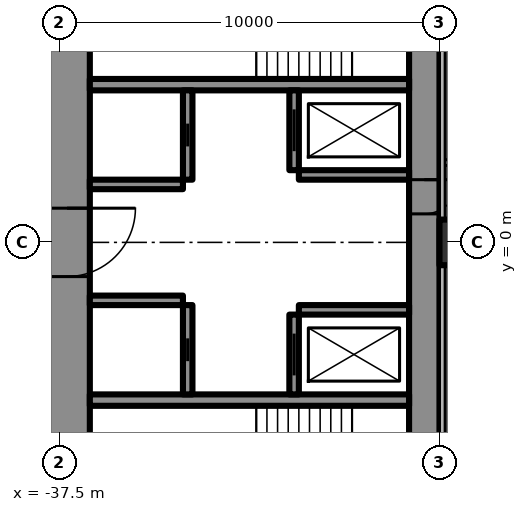
"""IFC4 building model, lengths in metres.
Left out: names, types, materials, properties, quantities, classifications, styles, units other than length and angle.
Written with IfcOpenShell. Run it as: python <this file> out.ifc"""

import sys

from ifc_helpers import new_model, si_unit, direction, frame, frame_2d, origin, origin_2d, place, context, subcontext, project, spatial, rectangle, hollow_rectangle, extrude, element, fill, save


model = new_model("IFC4")
c1 = context("Model", 3, precision=1e-05, world=origin(), true_north=direction((0.0, 1.0)))
c2 = subcontext(c1, "Body", "Model", "MODEL_VIEW")
j1 = project(units=[si_unit("LENGTHUNIT", "METRE"), si_unit("PLANEANGLEUNIT", "RADIAN")], contexts=[c1])
p1 = place(None, origin())
s1 = spatial("IfcSite", under=j1, at=p1, CompositionType="ELEMENT")
p2 = place(p1, origin())
s2 = spatial("IfcBuilding", under=s1, at=p2, CompositionType="ELEMENT")
p3 = place(p2, frame((0.0, 0.0, 215.3)))
s3 = spatial("IfcBuildingStorey", under=s2, at=p3, CompositionType="ELEMENT", Elevation=215.3)
p4 = place(p3, frame((-27.9, 8.6, 0.0), z_axis=(0.0, 0.0, 1.0), x_axis=(0.0, -1.0, 0.0)))
e1 = element("IfcWall", 1, at=p4, inside=s3, PredefinedType="SHEAR", context=c2, shape_type="SweptSolid", body=[
    extrude(rectangle(XDim=17.2, YDim=0.8, at=frame_2d((8.6, 0.0))), origin(), (0.0, 0.0, 1.0), 3.6),
])
p5 = place(p4, frame((6.95, 0.0, 0.0)))
e2 = element("IfcOpeningElement", 2, at=p5, cuts=e1, PredefinedType="OPENING", context=c2, shape_type="SweptSolid", body=[
    extrude(rectangle(XDim=0.9, YDim=2.2, at=frame_2d((0.45, 1.1))), frame((0.0, 0.41, 0.0), z_axis=(0.0, -1.0, 0.0), x_axis=(1.0, 0.0, 0.0)), (0.0, 0.0, 1.0), 0.82),
])
p6 = place(p3, frame((-37.3, 8.6, 0.0), z_axis=(0.0, 0.0, 1.0), x_axis=(0.0, -1.0, 0.0)))
e3 = element("IfcWall", 3, at=p6, inside=s3, PredefinedType="SHEAR", context=c2, shape_type="SweptSolid", body=[
    extrude(rectangle(XDim=17.2, YDim=1.2, at=frame_2d((8.6, 0.0))), origin(), (0.0, 0.0, 1.0), 3.6),
])
p7 = place(p6, frame((7.7, 0.0, 0.0)))
e4 = element("IfcOpeningElement", 4, at=p7, cuts=e3, PredefinedType="OPENING", context=c2, shape_type="SweptSolid", body=[
    extrude(rectangle(XDim=1.8, YDim=2.2, at=frame_2d((0.9, 1.1))), frame((0.0, 0.61, 0.0), z_axis=(0.0, -1.0, 0.0), x_axis=(1.0, 0.0, 0.0)), (0.0, 0.0, 1.0), 1.22),
])
for number, where, z_axis, x_axis in (
    (5, (-28.3, 4.15, 0.0), (0.0, 0.0, 1.0), (-1.0, 0.0, 0.0)),
    (6, (-28.3, -4.15, 0.0), (0.0, 0.0, 1.0), (-1.0, 0.0, 0.0)),
):
    element("IfcWall", number, at=place(p3, frame(where, z_axis=z_axis, x_axis=x_axis)), inside=s3, PredefinedType="SHEAR", context=c2, shape_type="SweptSolid", body=[
        extrude(rectangle(XDim=8.4, YDim=0.3, at=frame_2d((4.2, 0.0))), origin(), (0.0, 0.0, 1.0), 3.6),
    ])
p8 = place(p3, frame((-31.325, 4.0, 0.0), z_axis=(0.0, 0.0, 1.0), x_axis=(0.0, -1.0, 0.0)))
e7 = element("IfcWall", 7, at=p8, inside=s3, PredefinedType="SHEAR", context=c2, shape_type="SweptSolid", body=[
    extrude(rectangle(XDim=2.1, YDim=0.25, at=frame_2d((1.05, 0.0))), origin(), (0.0, 0.0, 1.0), 3.6),
])
p9 = place(p8, frame((0.5, 0.0, 0.0)))
e8 = element("IfcOpeningElement", 8, at=p9, cuts=e7, PredefinedType="OPENING", context=c2, shape_type="SweptSolid", body=[
    extrude(rectangle(XDim=1.1, YDim=2.2, at=frame_2d((0.55, 1.1))), frame((0.0, 0.135, 0.0), z_axis=(0.0, -1.0, 0.0), x_axis=(1.0, 0.0, 0.0)), (0.0, 0.0, 1.0), 0.27),
])
p10 = place(p3, frame((-34.125, 4.0, 0.0), z_axis=(0.0, 0.0, 1.0), x_axis=(0.0, -1.0, 0.0)))
e9 = element("IfcWall", 9, at=p10, inside=s3, PredefinedType="SHEAR", context=c2, shape_type="SweptSolid", body=[
    extrude(rectangle(XDim=2.35, YDim=0.25, at=frame_2d((1.175, 0.0))), origin(), (0.0, 0.0, 1.0), 3.6),
])
p11 = place(p10, frame((0.875, 0.0, 0.0)))
e10 = element("IfcOpeningElement", 10, at=p11, cuts=e9, PredefinedType="OPENING", context=c2, shape_type="SweptSolid", body=[
    extrude(rectangle(XDim=0.6, YDim=2.0, at=frame_2d((0.3, 1.0))), frame((0.0, 0.135, 0.0), z_axis=(0.0, -1.0, 0.0), x_axis=(1.0, 0.0, 0.0)), (0.0, 0.0, 1.0), 0.27),
])
p12 = place(p3, frame((-28.3, 1.775, 0.0), z_axis=(0.0, 0.0, 1.0), x_axis=(-1.0, 0.0, 0.0)))
e11 = element("IfcWall", 11, at=p12, inside=s3, PredefinedType="SHEAR", context=c2, shape_type="SweptSolid", body=[
    extrude(rectangle(XDim=2.9, YDim=0.25, at=frame_2d((1.45, 0.0))), origin(), (0.0, 0.0, 1.0), 3.6),
])
p13 = place(p3, frame((-34.25, 1.525, 0.0), z_axis=(0.0, 0.0, 1.0), x_axis=(-1.0, 0.0, 0.0)))
e12 = element("IfcWall", 12, at=p13, inside=s3, PredefinedType="SHEAR", context=c2, shape_type="SweptSolid", body=[
    extrude(rectangle(XDim=2.45, YDim=0.25, at=frame_2d((1.225, 0.0))), origin(), (0.0, 0.0, 1.0), 3.6),
])
p14 = place(p3, frame((-31.325, -1.9, 0.0), z_axis=(0.0, 0.0, 1.0), x_axis=(0.0, -1.0, 0.0)))
e13 = element("IfcWall", 13, at=p14, inside=s3, PredefinedType="SHEAR", context=c2, shape_type="SweptSolid", body=[
    extrude(rectangle(XDim=2.1, YDim=0.25, at=frame_2d((1.05, 0.0))), origin(), (0.0, 0.0, 1.0), 3.6),
])
p15 = place(p14, frame((0.5, 0.0, 0.0)))
e14 = element("IfcOpeningElement", 14, at=p15, cuts=e13, PredefinedType="OPENING", context=c2, shape_type="SweptSolid", body=[
    extrude(rectangle(XDim=1.1, YDim=2.2, at=frame_2d((0.55, 1.1))), frame((0.0, 0.135, 0.0), z_axis=(0.0, -1.0, 0.0), x_axis=(1.0, 0.0, 0.0)), (0.0, 0.0, 1.0), 0.27),
])
p16 = place(p3, frame((-34.125, -1.65, 0.0), z_axis=(0.0, 0.0, 1.0), x_axis=(0.0, -1.0, 0.0)))
e15 = element("IfcWall", 15, at=p16, inside=s3, PredefinedType="SHEAR", context=c2, shape_type="SweptSolid", body=[
    extrude(rectangle(XDim=2.35, YDim=0.25, at=frame_2d((1.175, 0.0))), origin(), (0.0, 0.0, 1.0), 3.6),
])
p17 = place(p16, frame((0.875, 0.0, 0.0)))
e16 = element("IfcOpeningElement", 16, at=p17, cuts=e15, PredefinedType="OPENING", context=c2, shape_type="SweptSolid", body=[
    extrude(rectangle(XDim=0.6, YDim=2.0, at=frame_2d((0.3, 1.0))), frame((0.0, 0.135, 0.0), z_axis=(0.0, -1.0, 0.0), x_axis=(1.0, 0.0, 0.0)), (0.0, 0.0, 1.0), 0.27),
])
p18 = place(p3, frame((-28.3, -1.775, 0.0), z_axis=(0.0, 0.0, 1.0), x_axis=(-1.0, 0.0, 0.0)))
e17 = element("IfcWall", 17, at=p18, inside=s3, PredefinedType="SHEAR", context=c2, shape_type="SweptSolid", body=[
    extrude(rectangle(XDim=2.9, YDim=0.25, at=frame_2d((1.45, 0.0))), origin(), (0.0, 0.0, 1.0), 3.6),
])
p19 = place(p3, frame((-34.25, -1.525, 0.0), z_axis=(0.0, 0.0, 1.0), x_axis=(-1.0, 0.0, 0.0)))
e18 = element("IfcWall", 18, at=p19, inside=s3, PredefinedType="SHEAR", context=c2, shape_type="SweptSolid", body=[
    extrude(rectangle(XDim=2.45, YDim=0.25, at=frame_2d((1.225, 0.0))), origin(), (0.0, 0.0, 1.0), 3.6),
])
p20 = place(p3, frame((-27.2, 14.3, 0.0), z_axis=(0.0, 0.0, 1.0), x_axis=(-0.866026593062, -0.499997940104, 0.0)))
e19 = element("IfcWall", 19, at=p20, inside=s3, PredefinedType="SHEAR", context=c2, shape_type="SweptSolid", body=[
    extrude(rectangle(XDim=28.946, YDim=1.2, at=frame_2d((14.473, 0.0))), origin(), (0.0, 0.0, 1.0), 3.6),
])
p21 = place(p20, frame((4.6, 0.0, 0.0)))
e20 = element("IfcOpeningElement", 20, at=p21, cuts=e19, PredefinedType="OPENING", context=c2, shape_type="SweptSolid", body=[
    extrude(rectangle(XDim=1.0, YDim=2.2, at=frame_2d((0.5, 1.1))), frame((0.0, 0.61, 0.0), z_axis=(0.0, -1.0, 0.0), x_axis=(1.0, 0.0, 0.0)), (0.0, 0.0, 1.0), 1.22),
])
p22 = place(p20, frame((13.395, 0.0, 0.0)))
e21 = element("IfcOpeningElement", 21, at=p22, cuts=e19, PredefinedType="OPENING", context=c2, shape_type="SweptSolid", body=[
    extrude(rectangle(XDim=1.8, YDim=2.2, at=frame_2d((0.9, 1.1))), frame((0.0, 0.61, 0.0), z_axis=(0.0, -1.0, 0.0), x_axis=(1.0, 0.0, 0.0)), (0.0, 0.0, 1.0), 1.22),
])
p23 = place(p3, frame((-27.2, -14.3, 0.0), z_axis=(0.0, 0.0, 1.0), x_axis=(-0.866024021859, 0.500002393557, 0.0)))
e22 = element("IfcWall", 22, at=p23, inside=s3, PredefinedType="SHEAR", context=c2, shape_type="SweptSolid", body=[
    extrude(rectangle(XDim=27.907, YDim=1.2, at=frame_2d((13.954, 0.0))), origin(), (0.0, 0.0, 1.0), 3.6),
])
p24 = place(p23, frame((4.6, 0.0, 0.0)))
e23 = element("IfcOpeningElement", 23, at=p24, cuts=e22, PredefinedType="OPENING", context=c2, shape_type="SweptSolid", body=[
    extrude(rectangle(XDim=1.0, YDim=2.2, at=frame_2d((0.5, 1.1))), frame((0.0, 0.61, 0.0), z_axis=(0.0, -1.0, 0.0), x_axis=(1.0, 0.0, 0.0)), (0.0, 0.0, 1.0), 1.22),
])
p25 = place(p23, frame((13.395, 0.0, 0.0)))
e24 = element("IfcOpeningElement", 24, at=p25, cuts=e22, PredefinedType="OPENING", context=c2, shape_type="SweptSolid", body=[
    extrude(rectangle(XDim=1.8, YDim=2.2, at=frame_2d((0.9, 1.1))), frame((0.0, 0.61, 0.0), z_axis=(0.0, -1.0, 0.0), x_axis=(1.0, 0.0, 0.0)), (0.0, 0.0, 1.0), 1.22),
])
p26 = place(p3, frame((-26.9, 0.0, 0.0), z_axis=(0.0, 0.0, 1.0), x_axis=(1.0, 0.0, 0.0)))
e25 = element("IfcColumn", 25, at=p26, inside=s3, PredefinedType="COLUMN", context=c2, shape_type="SweptSolid", body=[
    extrude(hollow_rectangle(XDim=1.2, YDim=1.2, WallThickness=0.12, at=origin_2d()), origin(), (0.0, 0.0, 1.0), 3.6),
])
p27 = place(p3, frame((-28.737, 16.068, 0.0), z_axis=(0.0, 0.0, 1.0), x_axis=(-0.866026057212, -0.499998868229, 0.0)))
e26 = element("IfcWall", 26, at=p27, inside=s3, PredefinedType="PARTITIONING", context=c2, shape_type="SweptSolid", body=[
    extrude(rectangle(XDim=32.137, YDim=0.2, at=frame_2d((16.068, 0.0))), origin(), (0.0, 0.0, 1.0), 3.35),
])
p28 = place(p27, frame((1.08, 0.0, 0.0)))
e27 = element("IfcOpeningElement", 27, at=p28, cuts=e26, PredefinedType="OPENING", context=c2, shape_type="SweptSolid", body=[
    extrude(rectangle(XDim=1.8, YDim=2.03, at=frame_2d((0.9, 1.015))), frame((0.0, 0.11, 0.0), z_axis=(0.0, -1.0, 0.0), x_axis=(1.0, 0.0, 0.0)), (0.0, 0.0, 1.0), 0.22),
])
p29 = place(p27, frame((6.86, 0.0, 0.0)))
e28 = element("IfcOpeningElement", 28, at=p29, cuts=e26, PredefinedType="OPENING", context=c2, shape_type="SweptSolid", body=[
    extrude(rectangle(XDim=1.0, YDim=2.2, at=frame_2d((0.5, 1.1))), frame((0.0, 0.11, 0.0), z_axis=(0.0, -1.0, 0.0), x_axis=(1.0, 0.0, 0.0)), (0.0, 0.0, 1.0), 0.22),
])
p30 = place(p27, frame((16.418, 0.0, 0.0)))
e29 = element("IfcOpeningElement", 29, at=p30, cuts=e26, PredefinedType="OPENING", context=c2, shape_type="SweptSolid", body=[
    extrude(rectangle(XDim=0.95, YDim=2.2, at=frame_2d((0.475, 1.1))), frame((0.0, 0.11, 0.0), z_axis=(0.0, -1.0, 0.0), x_axis=(1.0, 0.0, 0.0)), (0.0, 0.0, 1.0), 0.22),
])
p31 = place(p27, frame((20.567, 0.0, 0.0)))
e30 = element("IfcOpeningElement", 30, at=p31, cuts=e26, PredefinedType="OPENING", context=c2, shape_type="SweptSolid", body=[
    extrude(rectangle(XDim=0.95, YDim=2.2, at=frame_2d((0.475, 1.1))), frame((0.0, 0.11, 0.0), z_axis=(0.0, -1.0, 0.0), x_axis=(1.0, 0.0, 0.0)), (0.0, 0.0, 1.0), 0.22),
])
p32 = place(p27, frame((27.065, 0.0, 0.0)))
e31 = element("IfcOpeningElement", 31, at=p32, cuts=e26, PredefinedType="OPENING", context=c2, shape_type="SweptSolid", body=[
    extrude(rectangle(XDim=0.95, YDim=2.2, at=frame_2d((0.475, 1.1))), frame((0.0, 0.11, 0.0), z_axis=(0.0, -1.0, 0.0), x_axis=(1.0, 0.0, 0.0)), (0.0, 0.0, 1.0), 0.22),
])
p33 = place(p3, frame((-27.5, 0.3, 0.0), z_axis=(0.0, 0.0, 1.0), x_axis=(1.0, 0.0, 0.0)))
e32 = element("IfcWall", 32, at=p33, inside=s3, PredefinedType="PARTITIONING", context=c2, shape_type="SweptSolid", body=[
    extrude(rectangle(XDim=55.0, YDim=0.15, at=frame_2d((27.5, 0.0))), origin(), (0.0, 0.0, 1.0), 2.4),
])
p34 = place(p33, frame((1.575, 0.0, 0.0)))
e33 = element("IfcOpeningElement", 33, at=p34, cuts=e32, PredefinedType="OPENING", context=c2, shape_type="SweptSolid", body=[
    extrude(rectangle(XDim=1.0, YDim=2.2, at=frame_2d((0.5, 1.1))), frame((0.0, 0.085, 0.0), z_axis=(0.0, -1.0, 0.0), x_axis=(1.0, 0.0, 0.0)), (0.0, 0.0, 1.0), 0.17),
])
p35 = place(p33, frame((8.525, 0.0, 0.0)))
e34 = element("IfcOpeningElement", 34, at=p35, cuts=e32, PredefinedType="OPENING", context=c2, shape_type="SweptSolid", body=[
    extrude(rectangle(XDim=1.05, YDim=2.4, at=frame_2d((0.525, 1.2))), frame((0.0, 0.085, 0.0), z_axis=(0.0, -1.0, 0.0), x_axis=(1.0, 0.0, 0.0)), (0.0, 0.0, 1.0), 0.17),
])
p36 = place(p33, frame((14.025, 0.0, 0.0)))
e35 = element("IfcOpeningElement", 35, at=p36, cuts=e32, PredefinedType="OPENING", context=c2, shape_type="SweptSolid", body=[
    extrude(rectangle(XDim=1.05, YDim=2.4, at=frame_2d((0.525, 1.2))), frame((0.0, 0.085, 0.0), z_axis=(0.0, -1.0, 0.0), x_axis=(1.0, 0.0, 0.0)), (0.0, 0.0, 1.0), 0.17),
])
p37 = place(p33, frame((19.525, 0.0, 0.0)))
e36 = element("IfcOpeningElement", 36, at=p37, cuts=e32, PredefinedType="OPENING", context=c2, shape_type="SweptSolid", body=[
    extrude(rectangle(XDim=1.05, YDim=2.4, at=frame_2d((0.525, 1.2))), frame((0.0, 0.085, 0.0), z_axis=(0.0, -1.0, 0.0), x_axis=(1.0, 0.0, 0.0)), (0.0, 0.0, 1.0), 0.17),
])
p38 = place(p33, frame((25.025, 0.0, 0.0)))
e37 = element("IfcOpeningElement", 37, at=p38, cuts=e32, PredefinedType="OPENING", context=c2, shape_type="SweptSolid", body=[
    extrude(rectangle(XDim=1.05, YDim=2.4, at=frame_2d((0.525, 1.2))), frame((0.0, 0.085, 0.0), z_axis=(0.0, -1.0, 0.0), x_axis=(1.0, 0.0, 0.0)), (0.0, 0.0, 1.0), 0.17),
])
p39 = place(p33, frame((30.525, 0.0, 0.0)))
e38 = element("IfcOpeningElement", 38, at=p39, cuts=e32, PredefinedType="OPENING", context=c2, shape_type="SweptSolid", body=[
    extrude(rectangle(XDim=1.05, YDim=2.4, at=frame_2d((0.525, 1.2))), frame((0.0, 0.085, 0.0), z_axis=(0.0, -1.0, 0.0), x_axis=(1.0, 0.0, 0.0)), (0.0, 0.0, 1.0), 0.17),
])
p40 = place(p33, frame((36.025, 0.0, 0.0)))
e39 = element("IfcOpeningElement", 39, at=p40, cuts=e32, PredefinedType="OPENING", context=c2, shape_type="SweptSolid", body=[
    extrude(rectangle(XDim=1.05, YDim=2.4, at=frame_2d((0.525, 1.2))), frame((0.0, 0.085, 0.0), z_axis=(0.0, -1.0, 0.0), x_axis=(1.0, 0.0, 0.0)), (0.0, 0.0, 1.0), 0.17),
])
p41 = place(p33, frame((41.525, 0.0, 0.0)))
e40 = element("IfcOpeningElement", 40, at=p41, cuts=e32, PredefinedType="OPENING", context=c2, shape_type="SweptSolid", body=[
    extrude(rectangle(XDim=1.05, YDim=2.4, at=frame_2d((0.525, 1.2))), frame((0.0, 0.085, 0.0), z_axis=(0.0, -1.0, 0.0), x_axis=(1.0, 0.0, 0.0)), (0.0, 0.0, 1.0), 0.17),
])
p42 = place(p33, frame((47.025, 0.0, 0.0)))
e41 = element("IfcOpeningElement", 41, at=p42, cuts=e32, PredefinedType="OPENING", context=c2, shape_type="SweptSolid", body=[
    extrude(rectangle(XDim=1.05, YDim=2.4, at=frame_2d((0.525, 1.2))), frame((0.0, 0.085, 0.0), z_axis=(0.0, -1.0, 0.0), x_axis=(1.0, 0.0, 0.0)), (0.0, 0.0, 1.0), 0.17),
])
p43 = place(p33, frame((52.525, 0.0, 0.0)))
e42 = element("IfcOpeningElement", 42, at=p43, cuts=e32, PredefinedType="OPENING", context=c2, shape_type="SweptSolid", body=[
    extrude(rectangle(XDim=1.05, YDim=2.4, at=frame_2d((0.525, 1.2))), frame((0.0, 0.085, 0.0), z_axis=(0.0, -1.0, 0.0), x_axis=(1.0, 0.0, 0.0)), (0.0, 0.0, 1.0), 0.17),
])
p44 = place(p3, frame((-27.5, 2.1, 0.0), z_axis=(0.0, 0.0, 1.0), x_axis=(1.0, 0.0, 0.0)))
e43 = element("IfcWall", 43, at=p44, inside=s3, PredefinedType="PARTITIONING", context=c2, shape_type="SweptSolid", body=[
    extrude(rectangle(XDim=55.0, YDim=0.15, at=frame_2d((27.5, 0.0))), origin(), (0.0, 0.0, 1.0), 3.4),
])
p45 = place(p44, frame((2.025, 0.0, 0.0)))
e44 = element("IfcOpeningElement", 44, at=p45, cuts=e43, PredefinedType="OPENING", context=c2, shape_type="SweptSolid", body=[
    extrude(rectangle(XDim=1.05, YDim=2.4, at=frame_2d((0.525, 1.2))), frame((0.0, 0.085, 0.0), z_axis=(0.0, -1.0, 0.0), x_axis=(1.0, 0.0, 0.0)), (0.0, 0.0, 1.0), 0.17),
])
p46 = place(p44, frame((8.525, 0.0, 0.0)))
e45 = element("IfcOpeningElement", 45, at=p46, cuts=e43, PredefinedType="OPENING", context=c2, shape_type="SweptSolid", body=[
    extrude(rectangle(XDim=1.05, YDim=2.4, at=frame_2d((0.525, 1.2))), frame((0.0, 0.085, 0.0), z_axis=(0.0, -1.0, 0.0), x_axis=(1.0, 0.0, 0.0)), (0.0, 0.0, 1.0), 0.17),
])
p47 = place(p44, frame((14.025, 0.0, 0.0)))
e46 = element("IfcOpeningElement", 46, at=p47, cuts=e43, PredefinedType="OPENING", context=c2, shape_type="SweptSolid", body=[
    extrude(rectangle(XDim=1.05, YDim=2.4, at=frame_2d((0.525, 1.2))), frame((0.0, 0.085, 0.0), z_axis=(0.0, -1.0, 0.0), x_axis=(1.0, 0.0, 0.0)), (0.0, 0.0, 1.0), 0.17),
])
p48 = place(p44, frame((19.525, 0.0, 0.0)))
e47 = element("IfcOpeningElement", 47, at=p48, cuts=e43, PredefinedType="OPENING", context=c2, shape_type="SweptSolid", body=[
    extrude(rectangle(XDim=1.05, YDim=2.4, at=frame_2d((0.525, 1.2))), frame((0.0, 0.085, 0.0), z_axis=(0.0, -1.0, 0.0), x_axis=(1.0, 0.0, 0.0)), (0.0, 0.0, 1.0), 0.17),
])
p49 = place(p44, frame((25.025, 0.0, 0.0)))
e48 = element("IfcOpeningElement", 48, at=p49, cuts=e43, PredefinedType="OPENING", context=c2, shape_type="SweptSolid", body=[
    extrude(rectangle(XDim=1.05, YDim=2.4, at=frame_2d((0.525, 1.2))), frame((0.0, 0.085, 0.0), z_axis=(0.0, -1.0, 0.0), x_axis=(1.0, 0.0, 0.0)), (0.0, 0.0, 1.0), 0.17),
])
p50 = place(p44, frame((30.525, 0.0, 0.0)))
e49 = element("IfcOpeningElement", 49, at=p50, cuts=e43, PredefinedType="OPENING", context=c2, shape_type="SweptSolid", body=[
    extrude(rectangle(XDim=1.05, YDim=2.4, at=frame_2d((0.525, 1.2))), frame((0.0, 0.085, 0.0), z_axis=(0.0, -1.0, 0.0), x_axis=(1.0, 0.0, 0.0)), (0.0, 0.0, 1.0), 0.17),
])
p51 = place(p44, frame((36.025, 0.0, 0.0)))
e50 = element("IfcOpeningElement", 50, at=p51, cuts=e43, PredefinedType="OPENING", context=c2, shape_type="SweptSolid", body=[
    extrude(rectangle(XDim=1.05, YDim=2.4, at=frame_2d((0.525, 1.2))), frame((0.0, 0.085, 0.0), z_axis=(0.0, -1.0, 0.0), x_axis=(1.0, 0.0, 0.0)), (0.0, 0.0, 1.0), 0.17),
])
p52 = place(p44, frame((41.525, 0.0, 0.0)))
e51 = element("IfcOpeningElement", 51, at=p52, cuts=e43, PredefinedType="OPENING", context=c2, shape_type="SweptSolid", body=[
    extrude(rectangle(XDim=1.05, YDim=2.4, at=frame_2d((0.525, 1.2))), frame((0.0, 0.085, 0.0), z_axis=(0.0, -1.0, 0.0), x_axis=(1.0, 0.0, 0.0)), (0.0, 0.0, 1.0), 0.17),
])
p53 = place(p44, frame((47.025, 0.0, 0.0)))
e52 = element("IfcOpeningElement", 52, at=p53, cuts=e43, PredefinedType="OPENING", context=c2, shape_type="SweptSolid", body=[
    extrude(rectangle(XDim=1.05, YDim=2.4, at=frame_2d((0.525, 1.2))), frame((0.0, 0.085, 0.0), z_axis=(0.0, -1.0, 0.0), x_axis=(1.0, 0.0, 0.0)), (0.0, 0.0, 1.0), 0.17),
])
p54 = place(p44, frame((52.525, 0.0, 0.0)))
e53 = element("IfcOpeningElement", 53, at=p54, cuts=e43, PredefinedType="OPENING", context=c2, shape_type="SweptSolid", body=[
    extrude(rectangle(XDim=1.05, YDim=2.4, at=frame_2d((0.525, 1.2))), frame((0.0, 0.085, 0.0), z_axis=(0.0, -1.0, 0.0), x_axis=(1.0, 0.0, 0.0)), (0.0, 0.0, 1.0), 0.17),
])
p55 = place(p7, origin())
e54 = element("IfcDoor", 54, at=p55, inside=s3, OperationType="DOUBLE_DOOR_SINGLE_SWING", PredefinedType="DOOR", context=c2, shape_type="SweptSolid", body=[
    extrude(rectangle(XDim=1.8, YDim=2.2, at=frame_2d((0.9, 1.1))), frame((0.0, 0.025, 0.0), z_axis=(0.0, -1.0, 0.0), x_axis=(1.0, 0.0, 0.0)), (0.0, 0.0, 1.0), 0.05),
])
fill(e4, e54)
p56 = place(p5, origin())
e55 = element("IfcDoor", 55, at=p56, inside=s3, OperationType="SINGLE_SWING_LEFT", PredefinedType="DOOR", context=c2, shape_type="SweptSolid", body=[
    extrude(rectangle(XDim=0.9, YDim=2.2, at=frame_2d((0.45, 1.1))), frame((0.0, 0.025, 0.0), z_axis=(0.0, -1.0, 0.0), x_axis=(1.0, 0.0, 0.0)), (0.0, 0.0, 1.0), 0.05),
])
fill(e2, e55)
p57 = place(p9, origin())
e56 = element("IfcDoor", 56, at=p57, inside=s3, OperationType="SLIDING_TO_LEFT", PredefinedType="USERDEFINED", context=c2, shape_type="SweptSolid", body=[
    extrude(rectangle(XDim=1.1, YDim=2.2, at=frame_2d((0.55, 1.1))), frame((0.0, 0.025, 0.0), z_axis=(0.0, -1.0, 0.0), x_axis=(1.0, 0.0, 0.0)), (0.0, 0.0, 1.0), 0.05),
])
fill(e8, e56)
p58 = place(p15, origin())
e57 = element("IfcDoor", 57, at=p58, inside=s3, OperationType="SLIDING_TO_LEFT", PredefinedType="USERDEFINED", context=c2, shape_type="SweptSolid", body=[
    extrude(rectangle(XDim=1.1, YDim=2.2, at=frame_2d((0.55, 1.1))), frame((0.0, 0.025, 0.0), z_axis=(0.0, -1.0, 0.0), x_axis=(1.0, 0.0, 0.0)), (0.0, 0.0, 1.0), 0.05),
])
fill(e14, e57)
p59 = place(p11, origin())
e58 = element("IfcDoor", 58, at=p59, inside=s3, OperationType="SLIDING_TO_LEFT", PredefinedType="DOOR", context=c2, shape_type="SweptSolid", body=[
    extrude(rectangle(XDim=0.6, YDim=2.0, at=frame_2d((0.3, 1.0))), frame((0.0, 0.025, 0.0), z_axis=(0.0, -1.0, 0.0), x_axis=(1.0, 0.0, 0.0)), (0.0, 0.0, 1.0), 0.05),
])
fill(e10, e58)
p60 = place(p17, origin())
e59 = element("IfcDoor", 59, at=p60, inside=s3, OperationType="SLIDING_TO_LEFT", PredefinedType="DOOR", context=c2, shape_type="SweptSolid", body=[
    extrude(rectangle(XDim=0.6, YDim=2.0, at=frame_2d((0.3, 1.0))), frame((0.0, 0.025, 0.0), z_axis=(0.0, -1.0, 0.0), x_axis=(1.0, 0.0, 0.0)), (0.0, 0.0, 1.0), 0.05),
])
fill(e16, e59)
save(model, sys.argv[1])
